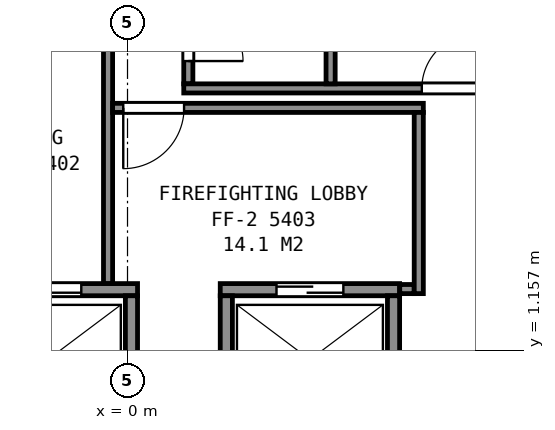
"""IFC4 building model, lengths in metres.
Left out: names, types, materials, properties, quantities, classifications, styles, units other than length and angle.
Written with IfcOpenShell. Run it as: python <this file> out.ifc"""

import sys

from ifc_helpers import new_model, si_unit, direction, frame, frame_2d, origin, place, context, subcontext, project, spatial, rectangle, extrude, element, fill, save


model = new_model("IFC4")
c1 = context("Model", 3, precision=1e-05, world=origin(), true_north=direction((0.0, 1.0)))
c2 = subcontext(c1, "Body", "Model", "MODEL_VIEW")
j1 = project(units=[si_unit("LENGTHUNIT", "METRE"), si_unit("PLANEANGLEUNIT", "RADIAN")], contexts=[c1])
p1 = place(None, origin())
s1 = spatial("IfcSite", under=j1, at=p1, CompositionType="ELEMENT")
p2 = place(p1, origin())
s2 = spatial("IfcBuilding", under=s1, at=p2, CompositionType="ELEMENT")
p3 = place(p2, frame((0.0, 0.0, 217.5)))
s3 = spatial("IfcBuildingStorey", under=s2, at=p3, CompositionType="ELEMENT", Elevation=217.5)
p4 = place(p3, frame((-2.785, 2.15, 0.0), z_axis=(0.0, 0.0, 1.0), x_axis=(1.0, 0.0, 0.0)))
e1 = element("IfcWall", 1, at=p4, inside=s3, PredefinedType="PARTITIONING", context=c2, shape_type="SweptSolid", body=[
    extrude(rectangle(XDim=2.95, YDim=0.2, at=frame_2d((1.475, 0.0))), origin(), (0.0, 0.0, 1.0), 3.7),
])
p5 = place(p4, frame((0.925, 0.0, 0.0)))
e2 = element("IfcOpeningElement", 2, at=p5, cuts=e1, PredefinedType="OPENING", context=c2, shape_type="SweptSolid", body=[
    extrude(rectangle(XDim=1.1, YDim=2.1, at=frame_2d((0.55, 1.05))), frame((0.0, 0.11, 0.0), z_axis=(0.0, -1.0, 0.0), x_axis=(1.0, 0.0, 0.0)), (0.0, 0.0, 1.0), 0.22),
])
p6 = place(p3, frame((1.525, 2.15, 0.0), z_axis=(0.0, 0.0, 1.0), x_axis=(1.0, 0.0, 0.0)))
e3 = element("IfcWall", 3, at=p6, inside=s3, PredefinedType="PARTITIONING", context=c2, shape_type="SweptSolid", body=[
    extrude(rectangle(XDim=2.95, YDim=0.2, at=frame_2d((1.475, 0.0))), origin(), (0.0, 0.0, 1.0), 3.7),
])
p7 = place(p6, frame((0.925, 0.0, 0.0)))
e4 = element("IfcOpeningElement", 4, at=p7, cuts=e3, PredefinedType="OPENING", context=c2, shape_type="SweptSolid", body=[
    extrude(rectangle(XDim=1.1, YDim=2.1, at=frame_2d((0.55, 1.05))), frame((0.0, 0.11, 0.0), z_axis=(0.0, -1.0, 0.0), x_axis=(1.0, 0.0, 0.0)), (0.0, 0.0, 1.0), 0.22),
])
p8 = place(p3, frame((5.663, -1.612, 0.0), z_axis=(0.0, 0.0, 1.0), x_axis=(0.49998122708, 0.866036242063, 0.0)))
e5 = element("IfcWall", 5, at=p8, inside=s3, PredefinedType="PARTITIONING", context=c2, shape_type="SweptSolid", body=[
    extrude(rectangle(XDim=4.9, YDim=0.2, at=frame_2d((2.45, 0.0))), origin(), (0.0, 0.0, 1.0), 3.7),
])
for number, where, z_axis, x_axis in (
    (6, (4.375, 0.1, 0.0), (0.0, 0.0, 1.0), (0.0, 1.0, 0.0)),
    (7, (1.625, 0.1, 0.0), (0.0, 0.0, 1.0), (0.0, 1.0, 0.0)),
    (8, (0.065, 0.1, 0.0), (0.0, 0.0, 1.0), (0.0, 1.0, 0.0)),
):
    element("IfcWall", number, at=place(p3, frame(where, z_axis=z_axis, x_axis=x_axis)), inside=s3, PredefinedType="PARTITIONING", context=c2, shape_type="SweptSolid", body=[
        extrude(rectangle(XDim=1.95, YDim=0.2, at=frame_2d((0.975, 0.0))), origin(), (0.0, 0.0, 1.0), 3.7),
    ])
p9 = place(p3, frame((-0.32, 2.252, 0.0), z_axis=(0.0, 0.0, 1.0), x_axis=(0.0, 1.0, 0.0)))
e9 = element("IfcWall", 9, at=p9, inside=s3, PredefinedType="PARTITIONING", context=c2, shape_type="SweptSolid", body=[
    extrude(rectangle(XDim=4.063, YDim=0.15, at=frame_2d((2.031, 0.0))), origin(), (0.0, 0.0, 1.0), 3.45),
])
p10 = place(p3, frame((-0.245, 5.14, 0.0), z_axis=(0.0, 0.0, 1.0), x_axis=(1.0, 0.0, 0.0)))
e10 = element("IfcWall", 10, at=p10, inside=s3, PredefinedType="PARTITIONING", context=c2, shape_type="SweptSolid", body=[
    extrude(rectangle(XDim=5.11, YDim=0.15, at=frame_2d((2.555, 0.0))), origin(), (0.0, 0.0, 1.0), 3.45),
])
p11 = place(p10, frame((0.175, 0.0, 0.0)))
e11 = element("IfcOpeningElement", 11, at=p11, cuts=e10, PredefinedType="OPENING", context=c2, shape_type="SweptSolid", body=[
    extrude(rectangle(XDim=1.0, YDim=2.1, at=frame_2d((0.5, 1.05))), frame((0.0, 0.085, 0.0), z_axis=(0.0, -1.0, 0.0), x_axis=(1.0, 0.0, 0.0)), (0.0, 0.0, 1.0), 0.17),
])
p12 = place(p3, frame((1.0, 7.56, 0.0), z_axis=(0.0, 0.0, 1.0), x_axis=(0.0, -1.0, 0.0)))
e12 = element("IfcWall", 12, at=p12, inside=s3, PredefinedType="PARTITIONING", context=c2, shape_type="SweptSolid", body=[
    extrude(rectangle(XDim=2.025, YDim=0.15, at=frame_2d((1.013, 0.0))), origin(), (0.0, 0.0, 1.0), 3.45),
])
p13 = place(p12, frame((0.75, 0.0, 0.0)))
e13 = element("IfcOpeningElement", 13, at=p13, cuts=e12, PredefinedType="OPENING", context=c2, shape_type="SweptSolid", body=[
    extrude(rectangle(XDim=0.9, YDim=2.1, at=frame_2d((0.45, 1.05))), frame((0.0, 0.085, 0.0), z_axis=(0.0, -1.0, 0.0), x_axis=(1.0, 0.0, 0.0)), (0.0, 0.0, 1.0), 0.17),
])
p14 = place(p3, frame((0.925, 5.46, 0.0), z_axis=(0.0, 0.0, 1.0), x_axis=(1.0, 0.0, 0.0)))
e14 = element("IfcWall", 14, at=p14, inside=s3, PredefinedType="PARTITIONING", context=c2, shape_type="SweptSolid", body=[
    extrude(rectangle(XDim=5.22, YDim=0.15, at=frame_2d((2.61, 0.0))), origin(), (0.0, 0.0, 1.0), 3.45),
])
p15 = place(p14, frame((3.915, 0.0, 0.0)))
e15 = element("IfcOpeningElement", 15, at=p15, cuts=e14, PredefinedType="OPENING", context=c2, shape_type="SweptSolid", body=[
    extrude(rectangle(XDim=0.9, YDim=2.1, at=frame_2d((0.45, 1.05))), frame((0.0, 0.085, 0.0), z_axis=(0.0, -1.0, 0.0), x_axis=(1.0, 0.0, 0.0)), (0.0, 0.0, 1.0), 0.17),
])
p16 = place(p3, frame((3.34, 5.535, 0.0), z_axis=(0.0, 0.0, 1.0), x_axis=(0.0, 1.0, 0.0)))
e16 = element("IfcWall", 16, at=p16, inside=s3, PredefinedType="PARTITIONING", context=c2, shape_type="SweptSolid", body=[
    extrude(rectangle(XDim=2.025, YDim=0.15, at=frame_2d((1.013, 0.0))), origin(), (0.0, 0.0, 1.0), 3.45),
])
p17 = place(p3, frame((4.477, 2.16, 0.0), z_axis=(0.0, 0.0, 1.0), x_axis=(1.0, 0.0, 0.0)))
e17 = element("IfcWall", 17, at=p17, inside=s3, PredefinedType="PARTITIONING", context=c2, shape_type="SweptSolid", body=[
    extrude(rectangle(XDim=0.238, YDim=0.15, at=frame_2d((0.119, 0.0))), origin(), (0.0, 0.0, 1.0), 3.45),
])
p18 = place(p3, frame((4.79, 2.085, 0.0), z_axis=(0.0, 0.0, 1.0), x_axis=(0.0, 1.0, 0.0)))
e18 = element("IfcWall", 18, at=p18, inside=s3, PredefinedType="PARTITIONING", context=c2, shape_type="SweptSolid", body=[
    extrude(rectangle(XDim=2.98, YDim=0.15, at=frame_2d((1.49, 0.0))), origin(), (0.0, 0.0, 1.0), 3.45),
])
p19 = place(p3, frame((13.342, 2.306, 0.0), z_axis=(0.0, 0.0, 1.0), x_axis=(-0.49997440863, -0.866040178465, 0.0)))
e19 = element("IfcWall", 19, at=p19, inside=s3, PredefinedType="PARTITIONING", context=c2, shape_type="SweptSolid", body=[
    extrude(rectangle(XDim=17.335, YDim=0.1, at=frame_2d((8.667, 0.0))), origin(), (0.0, 0.0, 1.0), 2.713),
])
p20 = place(p19, frame((14.935, 0.0, 0.0)))
e20 = element("IfcOpeningElement", 20, at=p20, cuts=e19, PredefinedType="OPENING", context=c2, shape_type="SweptSolid", body=[
    extrude(rectangle(XDim=0.9, YDim=2.1, at=frame_2d((0.45, 1.05))), frame((0.0, 0.06, 0.0), z_axis=(0.0, -1.0, 0.0), x_axis=(1.0, 0.0, 0.0)), (0.0, 0.0, 1.0), 0.12),
])
p21 = place(p19, frame((10.794, 0.0, 0.0)))
e21 = element("IfcOpeningElement", 21, at=p21, cuts=e19, PredefinedType="OPENING", context=c2, shape_type="SweptSolid", body=[
    extrude(rectangle(XDim=0.9, YDim=2.1, at=frame_2d((0.45, 1.05))), frame((0.0, 0.06, 0.0), z_axis=(0.0, -1.0, 0.0), x_axis=(1.0, 0.0, 0.0)), (0.0, 0.0, 1.0), 0.12),
])
p22 = place(p19, frame((5.866, 0.0, 0.0)))
e22 = element("IfcOpeningElement", 22, at=p22, cuts=e19, PredefinedType="OPENING", context=c2, shape_type="SweptSolid", body=[
    extrude(rectangle(XDim=0.9, YDim=2.1, at=frame_2d((0.45, 1.05))), frame((0.0, 0.06, 0.0), z_axis=(0.0, -1.0, 0.0), x_axis=(1.0, 0.0, 0.0)), (0.0, 0.0, 1.0), 0.12),
])
p23 = place(p19, frame((1.395, 0.0, 0.0)))
e23 = element("IfcOpeningElement", 23, at=p23, cuts=e19, PredefinedType="OPENING", context=c2, shape_type="SweptSolid", body=[
    extrude(rectangle(XDim=0.9, YDim=2.1, at=frame_2d((0.45, 1.05))), frame((0.0, 0.06, 0.0), z_axis=(0.0, -1.0, 0.0), x_axis=(1.0, 0.0, 0.0)), (0.0, 0.0, 1.0), 0.12),
])
p24 = place(p5, origin())
e24 = element("IfcDoor", 24, at=p24, inside=s3, OperationType="SLIDING_TO_LEFT", PredefinedType="DOOR", context=c2, shape_type="SweptSolid", body=[
    extrude(rectangle(XDim=1.1, YDim=2.1, at=frame_2d((0.55, 1.05))), frame((0.0, 0.025, 0.0), z_axis=(0.0, -1.0, 0.0), x_axis=(1.0, 0.0, 0.0)), (0.0, 0.0, 1.0), 0.05),
])
fill(e2, e24)
p25 = place(p7, origin())
e25 = element("IfcDoor", 25, at=p25, inside=s3, OperationType="SLIDING_TO_RIGHT", PredefinedType="DOOR", context=c2, shape_type="SweptSolid", body=[
    extrude(rectangle(XDim=1.1, YDim=2.1, at=frame_2d((0.55, 1.05))), frame((0.0, 0.025, 0.0), z_axis=(0.0, -1.0, 0.0), x_axis=(1.0, 0.0, 0.0)), (0.0, 0.0, 1.0), 0.05),
])
fill(e4, e25)
p26 = place(p11, origin())
e26 = element("IfcDoor", 26, at=p26, inside=s3, OperationType="SINGLE_SWING_LEFT", PredefinedType="DOOR", context=c2, shape_type="SweptSolid", body=[
    extrude(rectangle(XDim=1.0, YDim=2.1, at=frame_2d((0.5, 1.05))), frame((0.0, 0.025, 0.0), z_axis=(0.0, -1.0, 0.0), x_axis=(1.0, 0.0, 0.0)), (0.0, 0.0, 1.0), 0.05),
])
fill(e11, e26)
p27 = place(p13, origin())
e27 = element("IfcDoor", 27, at=p27, inside=s3, OperationType="SINGLE_SWING_RIGHT", PredefinedType="DOOR", context=c2, shape_type="SweptSolid", body=[
    extrude(rectangle(XDim=0.9, YDim=2.1, at=frame_2d((0.45, 1.05))), frame((0.0, 0.025, 0.0), z_axis=(0.0, -1.0, 0.0), x_axis=(1.0, 0.0, 0.0)), (0.0, 0.0, 1.0), 0.05),
])
fill(e13, e27)
p28 = place(p15, origin())
e28 = element("IfcDoor", 28, at=p28, inside=s3, OperationType="SINGLE_SWING_RIGHT", PredefinedType="DOOR", context=c2, shape_type="SweptSolid", body=[
    extrude(rectangle(XDim=0.9, YDim=2.1, at=frame_2d((0.45, 1.05))), frame((0.0, 0.025, 0.0), z_axis=(0.0, -1.0, 0.0), x_axis=(1.0, 0.0, 0.0)), (0.0, 0.0, 1.0), 0.05),
])
fill(e15, e28)
save(model, sys.argv[1])
